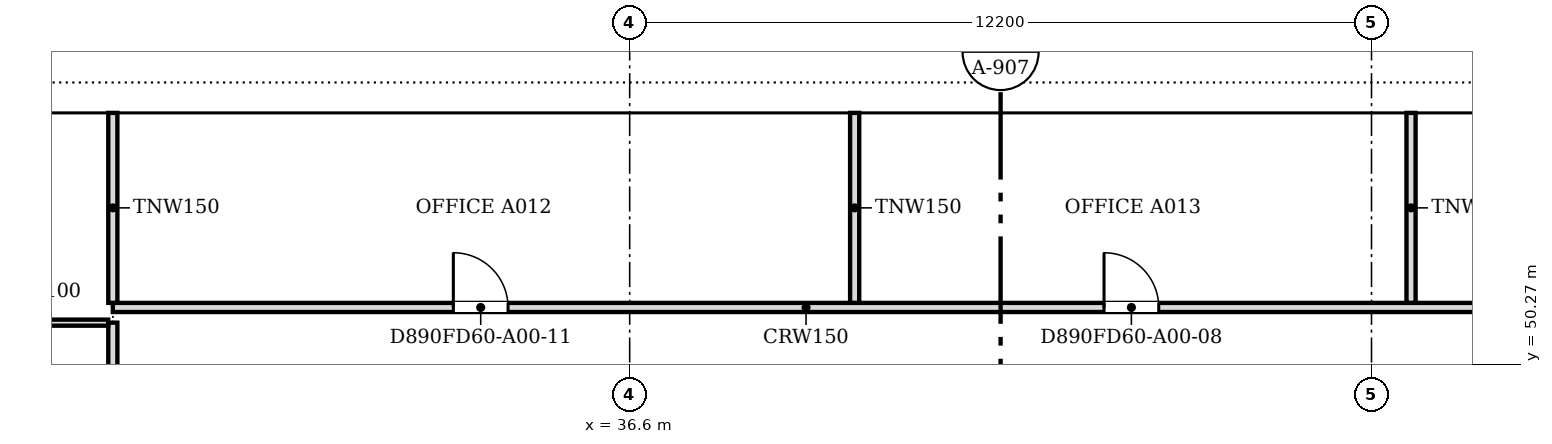
"""IFC4 building model, lengths in metres.
Left out: names, types, materials, properties, quantities, classifications, styles, units other than length and angle.
Written with IfcOpenShell. Run it as: python <this file> out.ifc"""

import sys

from ifc_helpers import new_model, si_unit, direction, frame, frame_2d, origin, place, context, subcontext, project, spatial, polyline, rectangle, outline, extrude, faceted_brep, source, transform, mapped, element, fill, save


model = new_model("IFC4")
c1 = context("Model", 3, precision=1e-05, world=origin(), true_north=direction((0.0, 1.0)))
c2 = subcontext(c1, "Body", "Model", "MODEL_VIEW")
j1 = project(units=[si_unit("LENGTHUNIT", "METRE"), si_unit("PLANEANGLEUNIT", "RADIAN")], contexts=[c1])
p1 = place(None, origin())
s1 = spatial("IfcSite", under=j1, at=p1, CompositionType="ELEMENT")
p2 = place(p1, origin())
s2 = spatial("IfcBuilding", under=s1, at=p2, CompositionType="ELEMENT")
p3 = place(p2, frame((0.0, 0.0, 16.8)))
s3 = spatial("IfcBuildingStorey", under=s2, at=p3, CompositionType="ELEMENT", Elevation=16.8)
m1 = source(origin(), c2, "Body", "SweptSolid", [
    extrude(outline(polyline([(6.1, 0.0), (3.05, 4.5), (0.0, 0.0), (6.1, 0.0)])), frame((0.0, 0.25, 0.0), z_axis=(0.0, -1.0, 0.0), x_axis=(1.0, 0.0, 0.0)), (0.0, 0.0, 1.0), 0.5),
])
p4 = place(p3, frame((51.85, 54.65, 0.0), z_axis=(0.0, 0.0, 1.0), x_axis=(-1.0, 0.0, 0.0)))
e1 = element("IfcWall", 1, at=p4, inside=s3, PredefinedType="SOLIDWALL", context=c2, shape_type="MappedRepresentation", body=[
    mapped(m1, transform((0.0, 0.0, 0.0), scale=1.0)),
])
m2 = source(origin(), c2, "Body", "SweptSolid", [
    extrude(outline(polyline([(5.629, 0.25), (3.05, 4.054), (0.471, 0.25), (5.629, 0.25)])), frame((0.0, 0.26, 0.0), z_axis=(0.0, -1.0, 0.0), x_axis=(1.0, 0.0, 0.0)), (0.0, 0.0, 1.0), 0.52),
])
p5 = place(p4, origin())
e2 = element("IfcOpeningElement", 2, at=p5, cuts=e1, PredefinedType="OPENING", context=c2, shape_type="MappedRepresentation", body=[
    mapped(m2, transform((0.0, 0.0, 0.0), scale=1.0)),
])
p6 = place(p3, frame((45.75, 54.65, 0.0), z_axis=(0.0, 0.0, 1.0), x_axis=(-1.0, 0.0, 0.0)))
e3 = element("IfcWall", 3, at=p6, inside=s3, PredefinedType="SOLIDWALL", context=c2, shape_type="MappedRepresentation", body=[
    mapped(m1, transform((0.0, 0.0, 0.0), scale=1.0)),
])
p7 = place(p6, origin())
e4 = element("IfcOpeningElement", 4, at=p7, cuts=e3, PredefinedType="OPENING", context=c2, shape_type="MappedRepresentation", body=[
    mapped(m2, transform((0.0, 0.0, 0.0), scale=1.0)),
])
m3 = source(origin(), c2, "Body", "Brep", [
    faceted_brep([(6.1, -0.25, 0.0), (3.05, -0.25, 4.5), (0.0, -0.25, 0.0), (6.1, -0.25, 0.0), (0.0, 0.25, 0.0), (3.05, 0.25, 4.5), (6.1, 0.25, 0.0), (6.1, 0.25, 0.0)], [[[0, 1, 2, 3]], [[4, 5, 6, 7]], [[6, 5, 1, 0]], [[5, 4, 2, 1]], [[4, 7, 3, 2]], [[3, 7, 6, 0]]]),
])
p8 = place(p3, frame((39.65, 54.65, 0.0), z_axis=(0.0, 0.0, 1.0), x_axis=(-1.0, 0.0, 0.0)))
e5 = element("IfcWall", 5, at=p8, inside=s3, PredefinedType="SOLIDWALL", context=c2, shape_type="MappedRepresentation", body=[
    mapped(m3, transform((0.0, 0.0, 0.0), scale=1.0)),
])
p9 = place(p8, origin())
e6 = element("IfcOpeningElement", 6, at=p9, cuts=e5, PredefinedType="OPENING", context=c2, shape_type="MappedRepresentation", body=[
    mapped(m2, transform((0.0, 0.0, 0.0), scale=1.0)),
])
p10 = place(p3, frame((33.55, 54.65, 0.0), z_axis=(0.0, 0.0, 1.0), x_axis=(-1.0, 0.0, 0.0)))
e7 = element("IfcWall", 7, at=p10, inside=s3, PredefinedType="SOLIDWALL", context=c2, shape_type="MappedRepresentation", body=[
    mapped(m1, transform((0.0, 0.0, 0.0), scale=1.0)),
])
p11 = place(p10, origin())
e8 = element("IfcOpeningElement", 8, at=p11, cuts=e7, PredefinedType="OPENING", context=c2, shape_type="MappedRepresentation", body=[
    mapped(m2, transform((0.0, 0.0, 0.0), scale=1.0)),
])
p12 = place(p3, frame((27.45, 54.65, 0.0), z_axis=(0.0, 0.0, 1.0), x_axis=(-1.0, 0.0, 0.0)))
e9 = element("IfcWall", 9, at=p12, inside=s3, PredefinedType="SOLIDWALL", context=c2, shape_type="MappedRepresentation", body=[
    mapped(m3, transform((0.0, 0.0, 0.0), scale=1.0)),
])
p13 = place(p12, origin())
e10 = element("IfcOpeningElement", 10, at=p13, cuts=e9, PredefinedType="OPENING", context=c2, shape_type="MappedRepresentation", body=[
    mapped(m2, transform((0.0, 0.0, 0.0), scale=1.0)),
])
p14 = place(p2, frame((0.0, 0.0, 21.3)))
s4 = spatial("IfcBuildingStorey", under=s2, at=p14, CompositionType="ELEMENT", Elevation=21.3)
m4 = source(origin(), c2, "Body", "Brep", [
    faceted_brep([(3.003, -0.25, 0.0), (6.053, -0.25, 4.5), (3.003, -0.25, 9.0), (0.0, -0.25, 4.5), (0.047, 0.25, 4.57), (3.003, 0.25, 9.0), (6.053, 0.25, 4.5), (3.003, 0.25, 0.0), (0.047, 0.25, 4.43), (0.0, 0.0, 4.5)], [[[0, 1, 2, 3]], [[4, 5, 6, 7, 8]], [[7, 6, 1, 0]], [[6, 5, 2, 1]], [[5, 4, 9, 3, 2]], [[8, 7, 0, 3, 9]], [[8, 9, 4]]]),
])
p15 = place(p14, frame((54.854, 54.65, -4.5), z_axis=(0.0, 0.0, 1.0), x_axis=(-1.0, 0.0, 0.0)))
e11 = element("IfcWall", 11, at=p15, inside=s4, PredefinedType="SOLIDWALL", context=c2, shape_type="MappedRepresentation", body=[
    mapped(m4, transform((0.0, 0.0, 0.0), scale=1.0)),
])
m5 = source(origin(), c2, "Body", "SweptSolid", [
    extrude(outline(polyline([(3.005, 0.448), (5.751, 4.5), (3.005, 8.552), (0.301, 4.5), (3.005, 0.448)])), frame((0.0, 0.26, 0.0), z_axis=(0.0, -1.0, 0.0), x_axis=(1.0, 0.0, 0.0)), (0.0, 0.0, 1.0), 0.52),
])
p16 = place(p15, origin())
e12 = element("IfcOpeningElement", 12, at=p16, cuts=e11, PredefinedType="OPENING", context=c2, shape_type="MappedRepresentation", body=[
    mapped(m5, transform((0.0, 0.0, 0.0), scale=1.0)),
])
m6 = source(origin(), c2, "Body", "SweptSolid", [
    extrude(outline(polyline([(3.05, 0.0), (6.1, 4.5), (3.05, 9.0), (0.0, 4.5), (3.05, 0.0)])), frame((0.0, 0.25, 0.0), z_axis=(0.0, -1.0, 0.0), x_axis=(1.0, 0.0, 0.0)), (0.0, 0.0, 1.0), 0.5),
])
p17 = place(p14, frame((48.8, 54.65, -4.5), z_axis=(0.0, 0.0, 1.0), x_axis=(-1.0, 0.0, 0.0)))
e13 = element("IfcWall", 13, at=p17, inside=s4, PredefinedType="SOLIDWALL", context=c2, shape_type="MappedRepresentation", body=[
    mapped(m6, transform((0.0, 0.0, 0.0), scale=1.0)),
])
m7 = source(origin(), c2, "Body", "SweptSolid", [
    extrude(outline(polyline([(3.05, 0.446), (5.798, 4.5), (3.05, 8.554), (0.302, 4.5), (3.05, 0.446)])), frame((0.0, 0.26, 0.0), z_axis=(0.0, -1.0, 0.0), x_axis=(1.0, 0.0, 0.0)), (0.0, 0.0, 1.0), 0.52),
])
p18 = place(p17, origin())
e14 = element("IfcOpeningElement", 14, at=p18, cuts=e13, PredefinedType="OPENING", context=c2, shape_type="MappedRepresentation", body=[
    mapped(m7, transform((0.0, 0.0, 0.0), scale=1.0)),
])
m8 = source(origin(), c2, "Body", "Brep", [
    faceted_brep([(3.05, -0.25, 0.0), (6.1, -0.25, 4.5), (6.1, -0.25, 4.5), (3.05, -0.25, 9.0), (0.0, -0.25, 4.5), (0.0, 0.25, 4.5), (3.05, 0.25, 9.0), (6.1, 0.25, 4.5), (6.1, 0.25, 4.5), (3.05, 0.25, 0.0)], [[[0, 1, 2, 3, 4]], [[5, 6, 7, 8, 9]], [[9, 8, 1, 0]], [[7, 6, 3, 2]], [[6, 5, 4, 3]], [[5, 9, 0, 4]], [[1, 8, 7, 2]]]),
])
p19 = place(p14, frame((42.7, 54.65, -4.5), z_axis=(0.0, 0.0, 1.0), x_axis=(-1.0, 0.0, 0.0)))
e15 = element("IfcWall", 15, at=p19, inside=s4, PredefinedType="SOLIDWALL", context=c2, shape_type="MappedRepresentation", body=[
    mapped(m8, transform((0.0, 0.0, 0.0), scale=1.0)),
])
p20 = place(p19, origin())
e16 = element("IfcOpeningElement", 16, at=p20, cuts=e15, PredefinedType="OPENING", context=c2, shape_type="MappedRepresentation", body=[
    mapped(m7, transform((0.0, 0.0, 0.0), scale=1.0)),
])
p21 = place(p14, frame((36.6, 54.65, -4.5), z_axis=(0.0, 0.0, 1.0), x_axis=(-1.0, 0.0, 0.0)))
e17 = element("IfcWall", 17, at=p21, inside=s4, PredefinedType="SOLIDWALL", context=c2, shape_type="MappedRepresentation", body=[
    mapped(m6, transform((0.0, 0.0, 0.0), scale=1.0)),
])
p22 = place(p21, origin())
e18 = element("IfcOpeningElement", 18, at=p22, cuts=e17, PredefinedType="OPENING", context=c2, shape_type="MappedRepresentation", body=[
    mapped(m7, transform((0.0, 0.0, 0.0), scale=1.0)),
])
p23 = place(p14, frame((30.5, 54.65, -4.5), z_axis=(0.0, 0.0, 1.0), x_axis=(-1.0, 0.0, 0.0)))
e19 = element("IfcWall", 19, at=p23, inside=s4, PredefinedType="SOLIDWALL", context=c2, shape_type="MappedRepresentation", body=[
    mapped(m6, transform((0.0, 0.0, 0.0), scale=1.0)),
])
p24 = place(p23, origin())
e20 = element("IfcOpeningElement", 20, at=p24, cuts=e19, PredefinedType="OPENING", context=c2, shape_type="MappedRepresentation", body=[
    mapped(m7, transform((0.0, 0.0, 0.0), scale=1.0)),
])
p25 = place(p3, frame((28.1, 47.776, 0.0), z_axis=(0.0, 0.0, 1.0), x_axis=(0.0, 1.0, 0.0)))
e21 = element("IfcWall", 21, at=p25, inside=s3, PredefinedType="PARTITIONING", context=c2, shape_type="SweptSolid", body=[
    extrude(rectangle(XDim=3.174, YDim=0.15, at=frame_2d((1.587, 0.0))), origin(), (0.0, 0.0, 1.0), 3.415),
])
p26 = place(p3, frame((22.826, 50.95, 0.0), z_axis=(0.0, 0.0, 1.0), x_axis=(1.0, 0.0, 0.0)))
e22 = element("IfcWall", 22, at=p26, inside=s3, PredefinedType="PARTITIONING", context=c2, shape_type="SweptSolid", body=[
    extrude(rectangle(XDim=5.198, YDim=0.1, at=frame_2d((2.599, 0.0))), origin(), (0.0, 0.0, 1.0), 3.415),
])
m9 = source(origin(), c2, "Body", "SweptSolid", [
    extrude(rectangle(XDim=0.9, YDim=2.1, at=frame_2d((0.45, 1.05))), frame((0.0, 0.06, 0.0), z_axis=(0.0, -1.0, 0.0), x_axis=(1.0, 0.0, 0.0)), (0.0, 0.0, 1.0), 0.12),
])
p27 = place(p26, frame((2.1, 0.0, 0.0)))
e23 = element("IfcOpeningElement", 23, at=p27, cuts=e22, PredefinedType="OPENING", context=c2, shape_type="MappedRepresentation", body=[
    mapped(m9, transform((0.0, 0.0, 0.0), scale=1.0)),
])
p28 = place(p3, frame((28.1, 51.2, 0.0), z_axis=(0.0, 0.0, 1.0), x_axis=(1.0, 0.0, 0.0)))
e24 = element("IfcWall", 24, at=p28, inside=s3, PredefinedType="PARTITIONING", context=c2, shape_type="SweptSolid", body=[
    extrude(rectangle(XDim=31.438, YDim=0.15, at=frame_2d((15.719, 0.0))), origin(), (0.0, 0.0, 1.0), 3.415),
])
m10 = source(origin(), c2, "Body", "SweptSolid", [
    extrude(rectangle(XDim=0.9, YDim=2.1, at=frame_2d((0.45, 1.05))), frame((0.0, 0.085, 0.0), z_axis=(0.0, -1.0, 0.0), x_axis=(1.0, 0.0, 0.0)), (0.0, 0.0, 1.0), 0.17),
])
p29 = place(p28, frame((16.301, 0.0, 0.0)))
e25 = element("IfcOpeningElement", 25, at=p29, cuts=e24, PredefinedType="OPENING", context=c2, shape_type="MappedRepresentation", body=[
    mapped(m10, transform((0.0, 0.0, 0.0), scale=1.0)),
])
p30 = place(p28, frame((25.95, 0.0, 0.0)))
e26 = element("IfcOpeningElement", 26, at=p30, cuts=e24, PredefinedType="OPENING", context=c2, shape_type="MappedRepresentation", body=[
    mapped(m10, transform((0.0, 0.0, 0.0), scale=1.0)),
])
p31 = place(p28, frame((5.6, 0.0, 0.0)))
e27 = element("IfcOpeningElement", 27, at=p31, cuts=e24, PredefinedType="OPENING", context=c2, shape_type="MappedRepresentation", body=[
    mapped(m10, transform((0.0, 0.0, 0.0), scale=1.0)),
])
for number, where, z_axis, x_axis in (
    (28, (28.1, 51.276, 0.0), (0.0, 0.0, 1.0), (0.0, 1.0, 0.0)),
    (29, (40.3, 51.276, 0.0), (0.0, 0.0, 1.0), (0.0, 1.0, 0.0)),
    (30, (49.45, 51.276, 0.0), (0.0, 0.0, 1.0), (0.0, 1.0, 0.0)),
):
    element("IfcWall", number, at=place(p3, frame(where, z_axis=z_axis, x_axis=x_axis)), inside=s3, PredefinedType="PARTITIONING", context=c2, shape_type="SweptSolid", body=[
        extrude(rectangle(XDim=3.124, YDim=0.15, at=frame_2d((1.562, 0.0))), origin(), (0.0, 0.0, 1.0), 3.415),
    ])
m11 = source(origin(), c2, "Body", "SweptSolid", [
    extrude(rectangle(XDim=0.9, YDim=2.1, at=frame_2d((0.45, 1.05))), frame((0.0, 0.025, 0.0), z_axis=(0.0, -1.0, 0.0), x_axis=(1.0, 0.0, 0.0)), (0.0, 0.0, 1.0), 0.05),
])
p32 = place(p29, origin())
e31 = element("IfcDoor", 31, at=p32, inside=s3, OperationType="SINGLE_SWING_LEFT", PredefinedType="DOOR", context=c2, shape_type="MappedRepresentation", body=[
    mapped(m11, transform((0.0, 0.0, 0.0), scale=1.0)),
])
fill(e25, e31)
p33 = place(p31, origin())
e32 = element("IfcDoor", 32, at=p33, inside=s3, OperationType="SINGLE_SWING_LEFT", PredefinedType="DOOR", context=c2, shape_type="MappedRepresentation", body=[
    mapped(m11, transform((0.0, 0.0, 0.0), scale=1.0)),
])
fill(e27, e32)
save(model, sys.argv[1])
